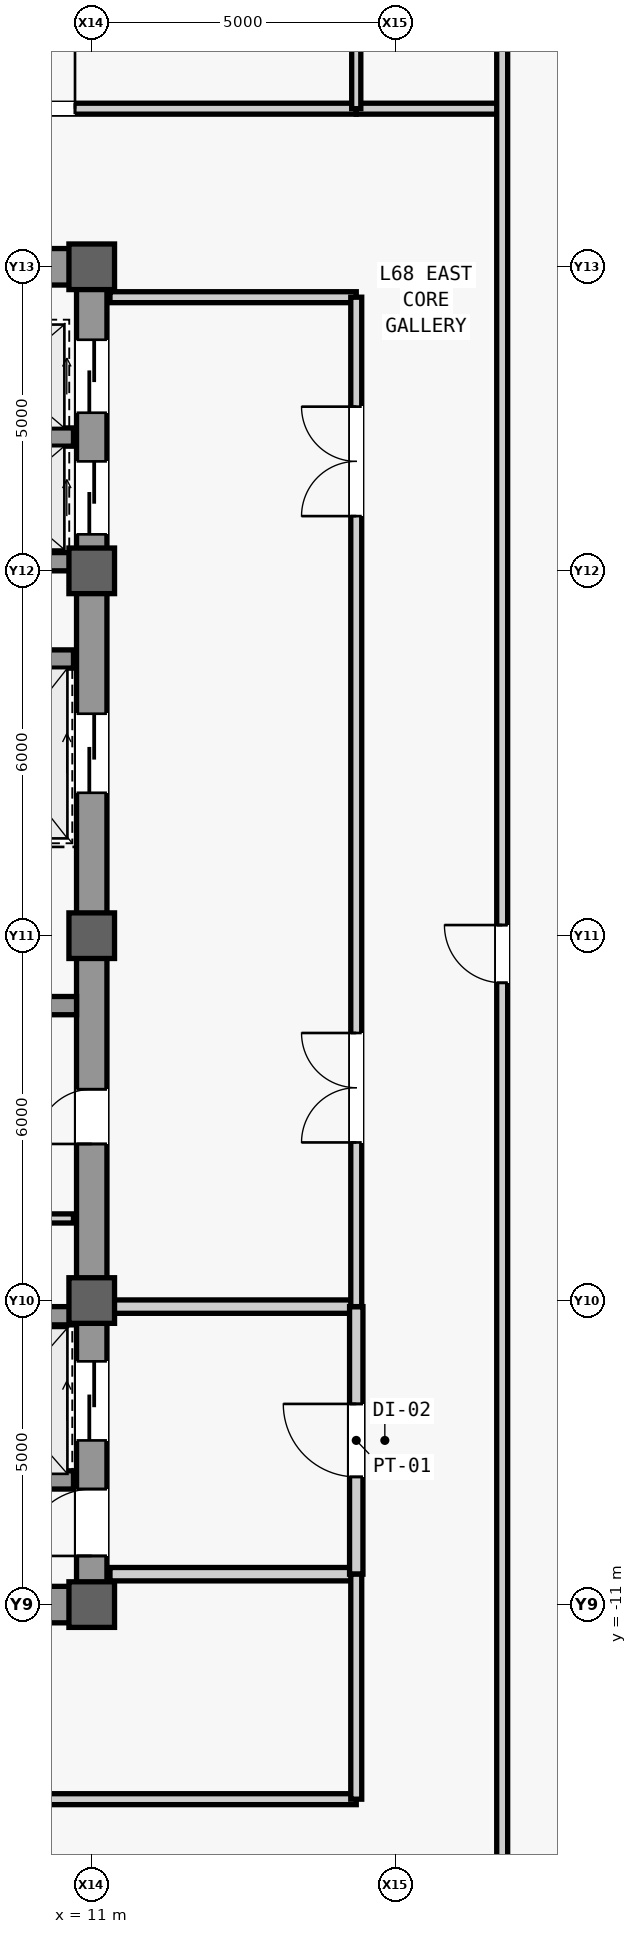
"""IFC4 building model, lengths in metres.
Left out: names, types, materials, properties, quantities, classifications, styles, units other than length and angle.
Written with IfcOpenShell. Run it as: python <this file> out.ifc"""

import sys

from ifc_helpers import new_model, si_unit, direction, frame, frame_2d, origin, origin_2d, place, context, subcontext, project, spatial, rectangle, extrude, source, transform, mapped, element, fill, save


model = new_model("IFC4")
c1 = context("Model", 3, precision=1e-05, world=origin(), true_north=direction((0.0, 1.0)))
c2 = subcontext(c1, "Body", "Model", "MODEL_VIEW")
j1 = project(units=[si_unit("LENGTHUNIT", "METRE"), si_unit("PLANEANGLEUNIT", "RADIAN")], contexts=[c1])
p1 = place(None, origin())
s1 = spatial("IfcSite", under=j1, at=p1, CompositionType="ELEMENT")
p2 = place(p1, origin())
s2 = spatial("IfcBuilding", under=s1, at=p2, CompositionType="ELEMENT")
p3 = place(p2, frame((0.0, 0.0, 289.5)))
s3 = spatial("IfcBuildingStorey", under=s2, at=p3, CompositionType="ELEMENT", Elevation=289.5)
m1 = source(origin(), c2, "Body", "SweptSolid", [
    extrude(rectangle(XDim=22.0, YDim=0.5, at=frame_2d((11.0, 0.0))), origin(), (0.0, 0.0, 1.0), 3.78),
])
p4 = place(p3, frame((11.0, -11.0, 0.0), z_axis=(0.0, 0.0, 1.0), x_axis=(0.0, 1.0, 0.0)))
e1 = element("IfcWall", 1, at=p4, inside=s3, PredefinedType="SHEAR", context=c2, shape_type="MappedRepresentation", body=[
    mapped(m1, transform((0.0, 0.0, 0.0), scale=1.0)),
])
m2 = source(origin(), c2, "Body", "SweptSolid", [
    extrude(rectangle(XDim=1.1, YDim=2.2, at=frame_2d((0.55, 1.1))), frame((0.0, 0.26, 0.0), z_axis=(0.0, -1.0, 0.0), x_axis=(1.0, 0.0, 0.0)), (0.0, 0.0, 1.0), 0.52),
])
p5 = place(p4, frame((0.8, 0.0, 0.0)))
e2 = element("IfcOpeningElement", 2, at=p5, cuts=e1, PredefinedType="OPENING", context=c2, shape_type="MappedRepresentation", body=[
    mapped(m2, transform((0.0, 0.0, 0.0), scale=1.0)),
])
m3 = source(origin(), c2, "Body", "SweptSolid", [
    extrude(rectangle(XDim=0.9, YDim=2.15, at=frame_2d((0.45, 1.075))), frame((0.0, 0.26, 0.0), z_axis=(0.0, -1.0, 0.0), x_axis=(1.0, 0.0, 0.0)), (0.0, 0.0, 1.0), 0.52),
])
p6 = place(p4, frame((7.575, 0.0, 0.0)))
e3 = element("IfcOpeningElement", 3, at=p6, cuts=e1, PredefinedType="OPENING", context=c2, shape_type="MappedRepresentation", body=[
    mapped(m3, transform((0.0, 0.0, 0.0), scale=1.0)),
])
m4 = source(origin(), c2, "Body", "SweptSolid", [
    extrude(rectangle(XDim=1.2, YDim=2.3, at=frame_2d((0.6, 1.15))), frame((0.0, 0.26, 0.0), z_axis=(0.0, -1.0, 0.0), x_axis=(1.0, 0.0, 0.0)), (0.0, 0.0, 1.0), 0.52),
])
p7 = place(p4, frame((17.6, 0.0, 0.0)))
e4 = element("IfcOpeningElement", 4, at=p7, cuts=e1, PredefinedType="OPENING", context=c2, shape_type="MappedRepresentation", body=[
    mapped(m4, transform((0.0, 0.0, 0.0), scale=1.0)),
])
p8 = place(p4, frame((19.6, 0.0, 0.0)))
e5 = element("IfcOpeningElement", 5, at=p8, cuts=e1, PredefinedType="OPENING", context=c2, shape_type="MappedRepresentation", body=[
    mapped(m4, transform((0.0, 0.0, 0.0), scale=1.0)),
])
m5 = source(origin(), c2, "Body", "SweptSolid", [
    extrude(rectangle(XDim=1.3, YDim=2.3, at=frame_2d((0.65, 1.15))), frame((0.0, 0.26, 0.0), z_axis=(0.0, -1.0, 0.0), x_axis=(1.0, 0.0, 0.0)), (0.0, 0.0, 1.0), 0.52),
])
p9 = place(p4, frame((2.7, 0.0, 0.0)))
e6 = element("IfcOpeningElement", 6, at=p9, cuts=e1, PredefinedType="OPENING", context=c2, shape_type="MappedRepresentation", body=[
    mapped(m5, transform((0.0, 0.0, 0.0), scale=1.0)),
])
p10 = place(p4, frame((13.35, 0.0, 0.0)))
e7 = element("IfcOpeningElement", 7, at=p10, cuts=e1, PredefinedType="OPENING", context=c2, shape_type="MappedRepresentation", body=[
    mapped(m5, transform((0.0, 0.0, 0.0), scale=1.0)),
])
m6 = source(origin(), c2, "Body", "SweptSolid", [
    extrude(rectangle(XDim=5.9, YDim=0.6, at=frame_2d((2.95, 0.0))), origin(), (0.0, 0.0, 1.0), 3.78),
])
p11 = place(p3, frame((4.85, -11.0, 0.0), z_axis=(0.0, 0.0, 1.0), x_axis=(1.0, 0.0, 0.0)))
e8 = element("IfcWall", 8, at=p11, inside=s3, PredefinedType="SHEAR", context=c2, shape_type="MappedRepresentation", body=[
    mapped(m6, transform((0.0, 0.0, 0.0), scale=1.0)),
])
p12 = place(p3, frame((4.85, 11.0, 0.0), z_axis=(0.0, 0.0, 1.0), x_axis=(1.0, 0.0, 0.0)))
e9 = element("IfcWall", 9, at=p12, inside=s3, PredefinedType="SHEAR", context=c2, shape_type="MappedRepresentation", body=[
    mapped(m6, transform((0.0, 0.0, 0.0), scale=1.0)),
])
m7 = source(origin(), c2, "Body", "SweptSolid", [
    extrude(rectangle(XDim=0.9, YDim=2.15, at=frame_2d((0.45, 1.075))), frame((0.0, 0.31, 0.0), z_axis=(0.0, -1.0, 0.0), x_axis=(1.0, 0.0, 0.0)), (0.0, 0.0, 1.0), 0.62),
])
p13 = place(p12, frame((0.5, 0.0, 0.0)))
e10 = element("IfcOpeningElement", 10, at=p13, cuts=e9, PredefinedType="OPENING", context=c2, shape_type="MappedRepresentation", body=[
    mapped(m7, transform((0.0, 0.0, 0.0), scale=1.0)),
])
m8 = source(origin(), c2, "Body", "SweptSolid", [
    extrude(rectangle(XDim=5.65, YDim=0.3, at=frame_2d((2.825, 0.0))), origin(), (0.0, 0.0, 1.0), 3.78),
])
p14 = place(p3, frame((5.1, -1.15, 0.0), z_axis=(0.0, 0.0, 1.0), x_axis=(1.0, 0.0, 0.0)))
e11 = element("IfcWall", 11, at=p14, inside=s3, PredefinedType="SHEAR", context=c2, shape_type="MappedRepresentation", body=[
    mapped(m8, transform((0.0, 0.0, 0.0), scale=1.0)),
])
m9 = source(origin(), c2, "Body", "SweptSolid", [
    extrude(rectangle(XDim=0.75, YDim=0.75, at=origin_2d()), origin(), (0.0, 0.0, 1.0), 4.0),
])
for number, where, z_axis, x_axis in (
    (12, (11.0, -11.0, 0.0), (0.0, 0.0, 1.0), (1.0, 0.0, 0.0)),
    (13, (11.0, -6.0, 0.0), (0.0, 0.0, 1.0), (1.0, 0.0, 0.0)),
    (14, (11.0, 0.0, 0.0), (0.0, 0.0, 1.0), (1.0, 0.0, 0.0)),
    (15, (11.0, 6.0, 0.0), (0.0, 0.0, 1.0), (1.0, 0.0, 0.0)),
    (16, (11.0, 11.0, 0.0), (0.0, 0.0, 1.0), (1.0, 0.0, 0.0)),
):
    element("IfcColumn", number, at=place(p3, frame(where, z_axis=z_axis, x_axis=x_axis)), inside=s3, PredefinedType="COLUMN", context=c2, shape_type="MappedRepresentation", body=[
        mapped(m9, transform((0.0, 0.0, 0.0), scale=1.0)),
    ])
m10 = source(origin(), c2, "Body", "SweptSolid", [
    extrude(rectangle(XDim=2.2, YDim=0.3, at=frame_2d((1.1, 0.0))), origin(), (0.0, 0.0, 1.0), 3.78),
])
for number, where, z_axis, x_axis in (
    (17, (8.5, -8.95, 0.0), (0.0, 0.0, 1.0), (1.0, 0.0, 0.0)),
    (18, (8.5, -6.25, 0.0), (0.0, 0.0, 1.0), (1.0, 0.0, 0.0)),
):
    element("IfcWall", number, at=place(p3, frame(where, z_axis=z_axis, x_axis=x_axis)), inside=s3, PredefinedType="SHEAR", context=c2, shape_type="MappedRepresentation", body=[
        mapped(m10, transform((0.0, 0.0, 0.0), scale=1.0)),
    ])
m11 = source(origin(), c2, "Body", "SweptSolid", [
    extrude(rectangle(XDim=2.3, YDim=0.3, at=frame_2d((1.15, 0.0))), origin(), (0.0, 0.0, 1.0), 3.78),
])
for number, where, z_axis, x_axis in (
    (19, (8.4, 4.55, 0.0), (0.0, 0.0, 1.0), (1.0, 0.0, 0.0)),
    (20, (8.4, 6.15, 0.0), (0.0, 0.0, 1.0), (1.0, 0.0, 0.0)),
    (21, (8.4, 8.2, 0.0), (0.0, 0.0, 1.0), (1.0, 0.0, 0.0)),
):
    element("IfcWall", number, at=place(p3, frame(where, z_axis=z_axis, x_axis=x_axis)), inside=s3, PredefinedType="SHEAR", context=c2, shape_type="MappedRepresentation", body=[
        mapped(m11, transform((0.0, 0.0, 0.0), scale=1.0)),
    ])
m12 = source(origin(), c2, "Body", "SweptSolid", [
    extrude(rectangle(XDim=2.05, YDim=0.15, at=frame_2d((1.025, 0.0))), origin(), (0.0, 0.0, 1.0), 3.78),
])
p15 = place(p3, frame((8.65, -4.65, 0.0), z_axis=(0.0, 0.0, 1.0), x_axis=(1.0, 0.0, 0.0)))
e22 = element("IfcWall", 22, at=p15, inside=s3, PredefinedType="PARTITIONING", context=c2, shape_type="MappedRepresentation", body=[
    mapped(m12, transform((0.0, 0.0, 0.0), scale=1.0)),
])
m13 = source(origin(), c2, "Body", "SweptSolid", [
    extrude(rectangle(XDim=4.05, YDim=0.22, at=frame_2d((2.025, 0.0))), origin(), (0.0, 0.0, 1.0), 3.78),
])
p16 = place(p3, frame((11.3, -10.5, 0.0), z_axis=(0.0, 0.0, 1.0), x_axis=(1.0, 0.0, 0.0)))
e23 = element("IfcWall", 23, at=p16, inside=s3, PredefinedType="PARTITIONING", context=c2, shape_type="MappedRepresentation", body=[
    mapped(m13, transform((0.0, 0.0, 0.0), scale=1.0)),
])
m14 = source(origin(), c2, "Body", "SweptSolid", [
    extrude(rectangle(XDim=4.05, YDim=0.22, at=frame_2d((2.025, 0.0))), origin(), (0.0, 0.0, 1.0), 3.085),
])
p17 = place(p3, frame((11.3, -6.1, 0.0), z_axis=(0.0, 0.0, 1.0), x_axis=(1.0, 0.0, 0.0)))
e24 = element("IfcWall", 24, at=p17, inside=s3, PredefinedType="PARTITIONING", context=c2, shape_type="MappedRepresentation", body=[
    mapped(m14, transform((0.0, 0.0, 0.0), scale=1.0)),
])
m15 = source(origin(), c2, "Body", "SweptSolid", [
    extrude(rectangle(XDim=4.4, YDim=0.22, at=frame_2d((2.2, 0.0))), origin(), (0.0, 0.0, 1.0), 3.78),
])
p18 = place(p3, frame((15.35, -10.5, 0.0), z_axis=(0.0, 0.0, 1.0), x_axis=(0.0, 1.0, 0.0)))
e25 = element("IfcWall", 25, at=p18, inside=s3, PredefinedType="PARTITIONING", context=c2, shape_type="MappedRepresentation", body=[
    mapped(m15, transform((0.0, 0.0, 0.0), scale=1.0)),
])
m16 = source(origin(), c2, "Body", "SweptSolid", [
    extrude(rectangle(XDim=1.2, YDim=2.2, at=frame_2d((0.6, 1.1))), frame((0.0, 0.12, 0.0), z_axis=(0.0, -1.0, 0.0), x_axis=(1.0, 0.0, 0.0)), (0.0, 0.0, 1.0), 0.24),
])
p19 = place(p18, frame((1.6, 0.0, 0.0)))
e26 = element("IfcOpeningElement", 26, at=p19, cuts=e25, PredefinedType="OPENING", context=c2, shape_type="MappedRepresentation", body=[
    mapped(m16, transform((0.0, 0.0, 0.0), scale=1.0)),
])
m17 = source(origin(), c2, "Body", "SweptSolid", [
    extrude(rectangle(XDim=4.05, YDim=0.18, at=frame_2d((2.025, 0.0))), origin(), (0.0, 0.0, 1.0), 3.78),
])
p20 = place(p3, frame((11.3, 10.5, 0.0), z_axis=(0.0, 0.0, 1.0), x_axis=(1.0, 0.0, 0.0)))
e27 = element("IfcWall", 27, at=p20, inside=s3, PredefinedType="PARTITIONING", context=c2, shape_type="MappedRepresentation", body=[
    mapped(m17, transform((0.0, 0.0, 0.0), scale=1.0)),
])
m18 = source(origin(), c2, "Body", "SweptSolid", [
    extrude(rectangle(XDim=16.6, YDim=0.18, at=frame_2d((8.3, 0.0))), origin(), (0.0, 0.0, 1.0), 3.78),
])
p21 = place(p3, frame((15.35, -6.1, 0.0), z_axis=(0.0, 0.0, 1.0), x_axis=(0.0, 1.0, 0.0)))
e28 = element("IfcWall", 28, at=p21, inside=s3, PredefinedType="PARTITIONING", context=c2, shape_type="MappedRepresentation", body=[
    mapped(m18, transform((0.0, 0.0, 0.0), scale=1.0)),
])
m19 = source(origin(), c2, "Body", "SweptSolid", [
    extrude(rectangle(XDim=1.8, YDim=2.25, at=frame_2d((0.9, 1.125))), frame((0.0, 0.1, 0.0), z_axis=(0.0, -1.0, 0.0), x_axis=(1.0, 0.0, 0.0)), (0.0, 0.0, 1.0), 0.2),
])
p22 = place(p21, frame((2.7, 0.0, 0.0)))
e29 = element("IfcOpeningElement", 29, at=p22, cuts=e28, PredefinedType="OPENING", context=c2, shape_type="MappedRepresentation", body=[
    mapped(m19, transform((0.0, 0.0, 0.0), scale=1.0)),
])
p23 = place(p21, frame((13.0, 0.0, 0.0)))
e30 = element("IfcOpeningElement", 30, at=p23, cuts=e28, PredefinedType="OPENING", context=c2, shape_type="MappedRepresentation", body=[
    mapped(m19, transform((0.0, 0.0, 0.0), scale=1.0)),
])
m20 = source(origin(), c2, "Body", "SweptSolid", [
    extrude(rectangle(XDim=14.05, YDim=0.18, at=frame_2d((7.025, 0.0))), origin(), (0.0, 0.0, 1.0), 3.78),
])
p24 = place(p3, frame((1.3, -14.2, 0.0), z_axis=(0.0, 0.0, 1.0), x_axis=(1.0, 0.0, 0.0)))
e31 = element("IfcWall", 31, at=p24, inside=s3, PredefinedType="PARTITIONING", context=c2, shape_type="MappedRepresentation", body=[
    mapped(m20, transform((0.0, 0.0, 0.0), scale=1.0)),
])
m21 = source(origin(), c2, "Body", "SweptSolid", [
    extrude(rectangle(XDim=0.9, YDim=2.15, at=frame_2d((0.45, 1.075))), frame((0.0, 0.1, 0.0), z_axis=(0.0, -1.0, 0.0), x_axis=(1.0, 0.0, 0.0)), (0.0, 0.0, 1.0), 0.2),
])
p25 = place(p24, frame((6.25, 0.0, 0.0)))
e32 = element("IfcOpeningElement", 32, at=p25, cuts=e31, PredefinedType="OPENING", context=c2, shape_type="MappedRepresentation", body=[
    mapped(m21, transform((0.0, 0.0, 0.0), scale=1.0)),
])
m22 = source(origin(), c2, "Body", "SweptSolid", [
    extrude(rectangle(XDim=3.7, YDim=0.18, at=frame_2d((1.85, 0.0))), origin(), (0.0, 0.0, 1.0), 3.78),
])
p26 = place(p3, frame((15.35, -14.2, 0.0), z_axis=(0.0, 0.0, 1.0), x_axis=(0.0, 1.0, 0.0)))
e33 = element("IfcWall", 33, at=p26, inside=s3, PredefinedType="PARTITIONING", context=c2, shape_type="MappedRepresentation", body=[
    mapped(m22, transform((0.0, 0.0, 0.0), scale=1.0)),
])
m23 = source(origin(), c2, "Body", "SweptSolid", [
    extrude(rectangle(XDim=2.4, YDim=0.18, at=frame_2d((1.2, 0.0))), origin(), (0.0, 0.0, 1.0), 3.78),
])
p27 = place(p3, frame((15.35, 13.6, 0.0), z_axis=(0.0, 0.0, 1.0), x_axis=(1.0, 0.0, 0.0)))
e34 = element("IfcWall", 34, at=p27, inside=s3, PredefinedType="PARTITIONING", context=c2, shape_type="MappedRepresentation", body=[
    mapped(m23, transform((0.0, 0.0, 0.0), scale=1.0)),
])
m24 = source(origin(), c2, "Body", "SweptSolid", [
    extrude(rectangle(XDim=32.75, YDim=0.18, at=frame_2d((16.375, 0.0))), origin(), (0.0, 0.0, 1.0), 3.78),
])
p28 = place(p3, frame((-17.4, 13.6, 0.0), z_axis=(0.0, 0.0, 1.0), x_axis=(1.0, 0.0, 0.0)))
e35 = element("IfcWall", 35, at=p28, inside=s3, PredefinedType="PARTITIONING", context=c2, shape_type="MappedRepresentation", body=[
    mapped(m24, transform((0.0, 0.0, 0.0), scale=1.0)),
])
m25 = source(origin(), c2, "Body", "SweptSolid", [
    extrude(rectangle(XDim=1.05, YDim=2.2, at=frame_2d((0.525, 1.1))), frame((0.0, 0.1, 0.0), z_axis=(0.0, -1.0, 0.0), x_axis=(1.0, 0.0, 0.0)), (0.0, 0.0, 1.0), 0.2),
])
p29 = place(p28, frame((27.075, 0.0, 0.0)))
e36 = element("IfcOpeningElement", 36, at=p29, cuts=e35, PredefinedType="OPENING", context=c2, shape_type="MappedRepresentation", body=[
    mapped(m25, transform((0.0, 0.0, 0.0), scale=1.0)),
])
m26 = source(origin(), c2, "Body", "SweptSolid", [
    extrude(rectangle(XDim=14.4, YDim=0.15, at=frame_2d((7.2, 0.0))), origin(), (0.0, 0.0, 1.0), 3.78),
])
p30 = place(p3, frame((15.35, 13.6, 0.0), z_axis=(0.0, 0.0, 1.0), x_axis=(0.0, 1.0, 0.0)))
e37 = element("IfcWall", 37, at=p30, inside=s3, PredefinedType="PARTITIONING", context=c2, shape_type="MappedRepresentation", body=[
    mapped(m26, transform((0.0, 0.0, 0.0), scale=1.0)),
])
m27 = source(origin(), c2, "Body", "SweptSolid", [
    extrude(rectangle(XDim=39.1, YDim=0.18, at=frame_2d((19.55, 0.0))), origin(), (0.0, 0.0, 1.0), 3.78),
])
p31 = place(p3, frame((17.75, -16.6, 0.0), z_axis=(0.0, 0.0, 1.0), x_axis=(0.0, 1.0, 0.0)))
e38 = element("IfcWall", 38, at=p31, inside=s3, PredefinedType="PARTITIONING", context=c2, shape_type="MappedRepresentation", body=[
    mapped(m27, transform((0.0, 0.0, 0.0), scale=1.0)),
])
m28 = source(origin(), c2, "Body", "SweptSolid", [
    extrude(rectangle(XDim=0.95, YDim=2.15, at=frame_2d((0.475, 1.075))), frame((0.0, 0.1, 0.0), z_axis=(0.0, -1.0, 0.0), x_axis=(1.0, 0.0, 0.0)), (0.0, 0.0, 1.0), 0.2),
])
p32 = place(p31, frame((15.825, 0.0, 0.0)))
e39 = element("IfcOpeningElement", 39, at=p32, cuts=e38, PredefinedType="OPENING", context=c2, shape_type="MappedRepresentation", body=[
    mapped(m28, transform((0.0, 0.0, 0.0), scale=1.0)),
])
m29 = source(origin(), c2, "Body", "SweptSolid", [
    extrude(rectangle(XDim=1.1, YDim=2.2, at=frame_2d((0.55, 1.1))), frame((0.0, 0.025, 0.0), z_axis=(0.0, -1.0, 0.0), x_axis=(1.0, 0.0, 0.0)), (0.0, 0.0, 1.0), 0.05),
])
p33 = place(p5, origin())
e40 = element("IfcDoor", 40, at=p33, inside=s3, OperationType="SINGLE_SWING_LEFT", PredefinedType="DOOR", context=c2, shape_type="MappedRepresentation", body=[
    mapped(m29, transform((0.0, 0.0, 0.0), scale=1.0)),
])
fill(e2, e40)
m30 = source(origin(), c2, "Body", "SweptSolid", [
    extrude(rectangle(XDim=0.9, YDim=2.15, at=frame_2d((0.45, 1.075))), frame((0.0, 0.025, 0.0), z_axis=(0.0, -1.0, 0.0), x_axis=(1.0, 0.0, 0.0)), (0.0, 0.0, 1.0), 0.05),
])
p34 = place(p6, origin())
e41 = element("IfcDoor", 41, at=p34, inside=s3, OperationType="SINGLE_SWING_LEFT", PredefinedType="DOOR", context=c2, shape_type="MappedRepresentation", body=[
    mapped(m30, transform((0.0, 0.0, 0.0), scale=1.0)),
])
fill(e3, e41)
m31 = source(origin(), c2, "Body", "SweptSolid", [
    extrude(rectangle(XDim=1.2, YDim=2.2, at=frame_2d((0.6, 1.1))), frame((0.0, 0.025, 0.0), z_axis=(0.0, -1.0, 0.0), x_axis=(1.0, 0.0, 0.0)), (0.0, 0.0, 1.0), 0.05),
])
p35 = place(p19, origin())
e42 = element("IfcDoor", 42, at=p35, inside=s3, OperationType="SINGLE_SWING_RIGHT", PredefinedType="DOOR", context=c2, shape_type="MappedRepresentation", body=[
    mapped(m31, transform((0.0, 0.0, 0.0), scale=1.0)),
])
fill(e26, e42)
m32 = source(origin(), c2, "Body", "SweptSolid", [
    extrude(rectangle(XDim=1.8, YDim=2.25, at=frame_2d((0.9, 1.125))), frame((0.0, 0.025, 0.0), z_axis=(0.0, -1.0, 0.0), x_axis=(1.0, 0.0, 0.0)), (0.0, 0.0, 1.0), 0.05),
])
p36 = place(p22, origin())
e43 = element("IfcDoor", 43, at=p36, inside=s3, OperationType="SINGLE_SWING_RIGHT", PredefinedType="DOOR", context=c2, shape_type="MappedRepresentation", body=[
    mapped(m32, transform((0.0, 0.0, 0.0), scale=1.0)),
])
fill(e29, e43)
p37 = place(p23, origin())
e44 = element("IfcDoor", 44, at=p37, inside=s3, OperationType="SINGLE_SWING_LEFT", PredefinedType="DOOR", context=c2, shape_type="MappedRepresentation", body=[
    mapped(m32, transform((0.0, 0.0, 0.0), scale=1.0)),
])
fill(e30, e44)
m33 = source(origin(), c2, "Body", "SweptSolid", [
    extrude(rectangle(XDim=1.05, YDim=2.2, at=frame_2d((0.525, 1.1))), frame((0.0, 0.025, 0.0), z_axis=(0.0, -1.0, 0.0), x_axis=(1.0, 0.0, 0.0)), (0.0, 0.0, 1.0), 0.05),
])
p38 = place(p29, origin())
e45 = element("IfcDoor", 45, at=p38, inside=s3, OperationType="SINGLE_SWING_RIGHT", PredefinedType="DOOR", context=c2, shape_type="MappedRepresentation", body=[
    mapped(m33, transform((0.0, 0.0, 0.0), scale=1.0)),
])
fill(e36, e45)
m34 = source(origin(), c2, "Body", "SweptSolid", [
    extrude(rectangle(XDim=0.95, YDim=2.15, at=frame_2d((0.475, 1.075))), frame((0.0, 0.025, 0.0), z_axis=(0.0, -1.0, 0.0), x_axis=(1.0, 0.0, 0.0)), (0.0, 0.0, 1.0), 0.05),
])
p39 = place(p32, origin())
e46 = element("IfcDoor", 46, at=p39, inside=s3, OperationType="SINGLE_SWING_RIGHT", PredefinedType="DOOR", context=c2, shape_type="MappedRepresentation", body=[
    mapped(m34, transform((0.0, 0.0, 0.0), scale=1.0)),
])
fill(e39, e46)
m35 = source(origin(), c2, "Body", "SweptSolid", [
    extrude(rectangle(XDim=1.2, YDim=2.3, at=frame_2d((0.6, 1.15))), frame((0.0, 0.025, 0.0), z_axis=(0.0, -1.0, 0.0), x_axis=(1.0, 0.0, 0.0)), (0.0, 0.0, 1.0), 0.05),
])
p40 = place(p7, origin())
e47 = element("IfcDoor", 47, at=p40, inside=s3, OperationType="SLIDING_TO_LEFT", PredefinedType="DOOR", context=c2, shape_type="MappedRepresentation", body=[
    mapped(m35, transform((0.0, 0.0, 0.0), scale=1.0)),
])
fill(e4, e47)
p41 = place(p8, origin())
e48 = element("IfcDoor", 48, at=p41, inside=s3, OperationType="SLIDING_TO_LEFT", PredefinedType="DOOR", context=c2, shape_type="MappedRepresentation", body=[
    mapped(m35, transform((0.0, 0.0, 0.0), scale=1.0)),
])
fill(e5, e48)
m36 = source(origin(), c2, "Body", "SweptSolid", [
    extrude(rectangle(XDim=1.3, YDim=2.3, at=frame_2d((0.65, 1.15))), frame((0.0, 0.025, 0.0), z_axis=(0.0, -1.0, 0.0), x_axis=(1.0, 0.0, 0.0)), (0.0, 0.0, 1.0), 0.05),
])
p42 = place(p9, origin())
e49 = element("IfcDoor", 49, at=p42, inside=s3, OperationType="SLIDING_TO_LEFT", PredefinedType="DOOR", context=c2, shape_type="MappedRepresentation", body=[
    mapped(m36, transform((0.0, 0.0, 0.0), scale=1.0)),
])
fill(e6, e49)
p43 = place(p10, origin())
e50 = element("IfcDoor", 50, at=p43, inside=s3, OperationType="SLIDING_TO_LEFT", PredefinedType="DOOR", context=c2, shape_type="MappedRepresentation", body=[
    mapped(m36, transform((0.0, 0.0, 0.0), scale=1.0)),
])
fill(e7, e50)
save(model, sys.argv[1])
